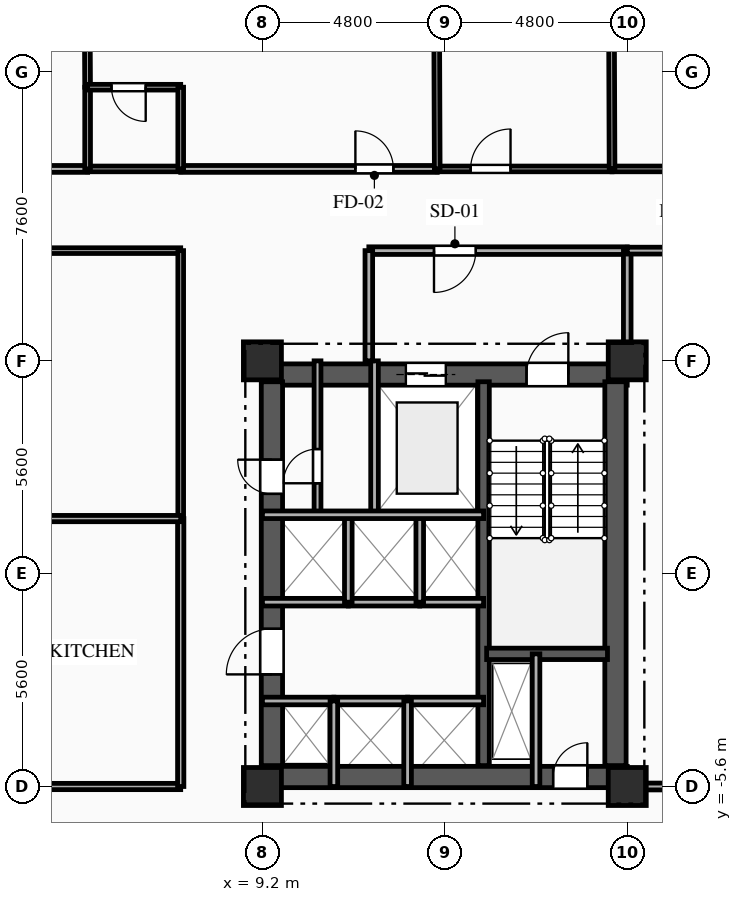
"""IFC4 building model, lengths in metres.
Left out: names, types, materials, properties, quantities, classifications, styles, units other than length and angle.
Written with IfcOpenShell. Run it as: python <this file> out.ifc"""

import sys

from ifc_helpers import new_model, si_unit, direction, frame, frame_2d, origin, origin_2d, place, context, subcontext, project, spatial, rectangle, extrude, element, fill, save


model = new_model("IFC4")
c1 = context("Model", 3, precision=1e-05, world=origin(), true_north=direction((0.0, 1.0)))
c2 = subcontext(c1, "Body", "Model", "MODEL_VIEW")
j1 = project(units=[si_unit("LENGTHUNIT", "METRE"), si_unit("PLANEANGLEUNIT", "RADIAN")], contexts=[c1])
p1 = place(None, origin())
s1 = spatial("IfcSite", under=j1, at=p1, CompositionType="ELEMENT")
p2 = place(p1, origin())
s2 = spatial("IfcBuilding", under=s1, at=p2, CompositionType="ELEMENT")
p3 = place(p2, frame((0.0, 0.0, 79.0)))
s3 = spatial("IfcBuildingStorey", under=s2, at=p3, CompositionType="ELEMENT", Elevation=79.0)
for number, where, z_axis, x_axis in (
    (1, (9.2, -5.6, 0.0), (0.0, 0.0, 1.0), (1.0, 0.0, 0.0)),
    (2, (9.2, 5.6, 0.0), (0.0, 0.0, 1.0), (1.0, 0.0, 0.0)),
    (3, (18.8, -5.6, 0.0), (0.0, 0.0, 1.0), (1.0, 0.0, 0.0)),
    (4, (18.8, 5.6, 0.0), (0.0, 0.0, 1.0), (1.0, 0.0, 0.0)),
):
    element("IfcColumn", number, at=place(p3, frame(where, z_axis=z_axis, x_axis=x_axis)), inside=s3, PredefinedType="COLUMN", context=c2, shape_type="SweptSolid", body=[
        extrude(rectangle(XDim=1.0, YDim=1.0, at=origin_2d()), origin(), (0.0, 0.0, 1.0), 3.35),
    ])
p4 = place(p3, frame((9.2, 5.24, 0.0), z_axis=(0.0, 0.0, 1.0), x_axis=(1.0, 0.0, 0.0)))
e5 = element("IfcWall", 5, at=p4, inside=s3, PredefinedType="SHEAR", context=c2, shape_type="SweptSolid", body=[
    extrude(rectangle(XDim=9.6, YDim=0.56, at=frame_2d((4.8, 0.0))), origin(), (0.0, 0.0, 1.0), 3.045),
])
p5 = place(p4, frame((6.95, 0.0, 0.0)))
e6 = element("IfcOpeningElement", 6, at=p5, cuts=e5, PredefinedType="OPENING", context=c2, shape_type="SweptSolid", body=[
    extrude(rectangle(XDim=1.1, YDim=2.15, at=frame_2d((0.55, 1.075))), frame((0.0, 0.29, 0.0), z_axis=(0.0, -1.0, 0.0), x_axis=(1.0, 0.0, 0.0)), (0.0, 0.0, 1.0), 0.58),
])
p6 = place(p4, frame((3.775, 0.0, 0.0)))
e7 = element("IfcOpeningElement", 7, at=p6, cuts=e5, PredefinedType="OPENING", context=c2, shape_type="SweptSolid", body=[
    extrude(rectangle(XDim=1.05, YDim=2.1, at=frame_2d((0.525, 1.05))), frame((0.0, 0.29, 0.0), z_axis=(0.0, -1.0, 0.0), x_axis=(1.0, 0.0, 0.0)), (0.0, 0.0, 1.0), 0.58),
])
p7 = place(p3, frame((9.2, -5.35, 0.0), z_axis=(0.0, 0.0, 1.0), x_axis=(1.0, 0.0, 0.0)))
e8 = element("IfcWall", 8, at=p7, inside=s3, PredefinedType="SHEAR", context=c2, shape_type="SweptSolid", body=[
    extrude(rectangle(XDim=9.6, YDim=0.56, at=frame_2d((4.8, 0.0))), origin(), (0.0, 0.0, 1.0), 3.045),
])
p8 = place(p7, frame((7.65, 0.0, 0.0)))
e9 = element("IfcOpeningElement", 9, at=p8, cuts=e8, PredefinedType="OPENING", context=c2, shape_type="SweptSolid", body=[
    extrude(rectangle(XDim=0.9, YDim=2.1, at=frame_2d((0.45, 1.05))), frame((0.0, 0.29, 0.0), z_axis=(0.0, -1.0, 0.0), x_axis=(1.0, 0.0, 0.0)), (0.0, 0.0, 1.0), 0.58),
])
p9 = place(p3, frame((9.45, -5.05, 0.0), z_axis=(0.0, 0.0, 1.0), x_axis=(0.0, 1.0, 0.0)))
e10 = element("IfcWall", 10, at=p9, inside=s3, PredefinedType="SHEAR", context=c2, shape_type="SweptSolid", body=[
    extrude(rectangle(XDim=10.1, YDim=0.56, at=frame_2d((5.05, 0.0))), origin(), (0.0, 0.0, 1.0), 3.045),
])
p10 = place(p9, frame((7.15, 0.0, 0.0)))
e11 = element("IfcOpeningElement", 11, at=p10, cuts=e10, PredefinedType="OPENING", context=c2, shape_type="SweptSolid", body=[
    extrude(rectangle(XDim=0.9, YDim=2.1, at=frame_2d((0.45, 1.05))), frame((0.0, 0.29, 0.0), z_axis=(0.0, -1.0, 0.0), x_axis=(1.0, 0.0, 0.0)), (0.0, 0.0, 1.0), 0.58),
])
p11 = place(p9, frame((2.4, 0.0, 0.0)))
e12 = element("IfcOpeningElement", 12, at=p11, cuts=e10, PredefinedType="OPENING", context=c2, shape_type="SweptSolid", body=[
    extrude(rectangle(XDim=1.2, YDim=2.15, at=frame_2d((0.6, 1.075))), frame((0.0, 0.29, 0.0), z_axis=(0.0, -1.0, 0.0), x_axis=(1.0, 0.0, 0.0)), (0.0, 0.0, 1.0), 0.58),
])
p12 = place(p3, frame((18.49, -5.05, 0.0), z_axis=(0.0, 0.0, 1.0), x_axis=(0.0, 1.0, 0.0)))
e13 = element("IfcWall", 13, at=p12, inside=s3, PredefinedType="SHEAR", context=c2, shape_type="SweptSolid", body=[
    extrude(rectangle(XDim=10.1, YDim=0.56, at=frame_2d((5.05, 0.0))), origin(), (0.0, 0.0, 1.0), 3.045),
])
p13 = place(p3, frame((15.02, -5.05, 0.0), z_axis=(0.0, 0.0, 1.0), x_axis=(0.0, 1.0, 0.0)))
e14 = element("IfcWall", 14, at=p13, inside=s3, PredefinedType="SHEAR", context=c2, shape_type="SweptSolid", body=[
    extrude(rectangle(XDim=10.1, YDim=0.3, at=frame_2d((5.05, 0.0))), origin(), (0.0, 0.0, 1.0), 3.045),
])
p14 = place(p3, frame((15.1, -2.11, 0.0), z_axis=(0.0, 0.0, 1.0), x_axis=(1.0, 0.0, 0.0)))
e15 = element("IfcWall", 15, at=p14, inside=s3, PredefinedType="SHEAR", context=c2, shape_type="SweptSolid", body=[
    extrude(rectangle(XDim=3.18, YDim=0.3, at=frame_2d((1.59, 0.0))), origin(), (0.0, 0.0, 1.0), 3.045),
])
p15 = place(p3, frame((16.4, -2.11, 0.0), z_axis=(0.0, 0.0, 1.0), x_axis=(0.0, -1.0, 0.0)))
e16 = element("IfcWall", 16, at=p15, inside=s3, PredefinedType="PARTITIONING", context=c2, shape_type="SweptSolid", body=[
    extrude(rectangle(XDim=3.49, YDim=0.2, at=frame_2d((1.745, 0.0))), origin(), (0.0, 0.0, 1.0), 3.045),
])
p16 = place(p3, frame((12.15, 5.6, 0.0), z_axis=(0.0, 0.0, 1.0), x_axis=(0.0, -1.0, 0.0)))
e17 = element("IfcWall", 17, at=p16, inside=s3, PredefinedType="PARTITIONING", context=c2, shape_type="SweptSolid", body=[
    extrude(rectangle(XDim=4.05, YDim=0.2, at=frame_2d((2.025, 0.0))), origin(), (0.0, 0.0, 1.0), 3.045),
])
p17 = place(p3, frame((18.8, 8.5, 0.0), z_axis=(0.0, 0.0, 1.0), x_axis=(-1.0, 0.0, 0.0)))
e18 = element("IfcWall", 18, at=p17, inside=s3, PredefinedType="PARTITIONING", context=c2, shape_type="SweptSolid", body=[
    extrude(rectangle(XDim=6.8, YDim=0.2, at=frame_2d((3.4, 0.0))), origin(), (0.0, 0.0, 1.0), 3.045),
])
p18 = place(p17, frame((3.985, 0.0, 0.0)))
e19 = element("IfcOpeningElement", 19, at=p18, cuts=e18, PredefinedType="OPENING", context=c2, shape_type="SweptSolid", body=[
    extrude(rectangle(XDim=1.1, YDim=2.15, at=frame_2d((0.55, 1.075))), frame((0.0, 0.11, 0.0), z_axis=(0.0, -1.0, 0.0), x_axis=(1.0, 0.0, 0.0)), (0.0, 0.0, 1.0), 0.22),
])
p19 = place(p3, frame((12.0, 8.5, 0.0), z_axis=(0.0, 0.0, 1.0), x_axis=(0.0, -1.0, 0.0)))
e20 = element("IfcWall", 20, at=p19, inside=s3, PredefinedType="PARTITIONING", context=c2, shape_type="SweptSolid", body=[
    extrude(rectangle(XDim=2.9, YDim=0.2, at=frame_2d((1.45, 0.0))), origin(), (0.0, 0.0, 1.0), 3.045),
])
p20 = place(p3, frame((18.8, 5.6, 0.0), z_axis=(0.0, 0.0, 1.0), x_axis=(0.0, 1.0, 0.0)))
e21 = element("IfcWall", 21, at=p20, inside=s3, PredefinedType="PARTITIONING", context=c2, shape_type="SweptSolid", body=[
    extrude(rectangle(XDim=2.9, YDim=0.2, at=frame_2d((1.45, 0.0))), origin(), (0.0, 0.0, 1.0), 2.53),
])
p21 = place(p3, frame((10.65, 1.55, 0.0), z_axis=(0.0, 0.0, 1.0), x_axis=(0.0, 1.0, 0.0)))
e22 = element("IfcWall", 22, at=p21, inside=s3, PredefinedType="PARTITIONING", context=c2, shape_type="SweptSolid", body=[
    extrude(rectangle(XDim=4.05, YDim=0.18, at=frame_2d((2.025, 0.0))), origin(), (0.0, 0.0, 1.0), 3.045),
])
p22 = place(p21, frame((0.829, 0.0, 0.0)))
e23 = element("IfcOpeningElement", 23, at=p22, cuts=e22, PredefinedType="OPENING", context=c2, shape_type="SweptSolid", body=[
    extrude(rectangle(XDim=0.9, YDim=2.1, at=frame_2d((0.45, 1.05))), frame((0.0, 0.1, 0.0), z_axis=(0.0, -1.0, 0.0), x_axis=(1.0, 0.0, 0.0)), (0.0, 0.0, 1.0), 0.2),
])
p23 = place(p3, frame((9.2, -3.35, 0.0), z_axis=(0.0, 0.0, 1.0), x_axis=(1.0, 0.0, 0.0)))
e24 = element("IfcWall", 24, at=p23, inside=s3, PredefinedType="PARTITIONING", context=c2, shape_type="SweptSolid", body=[
    extrude(rectangle(XDim=1.88, YDim=0.2, at=frame_2d((0.94, 0.0))), origin(), (0.0, 0.0, 1.0), 2.76),
])
p24 = place(p3, frame((11.08, -3.35, 0.0), z_axis=(0.0, 0.0, 1.0), x_axis=(1.0, 0.0, 0.0)))
e25 = element("IfcWall", 25, at=p24, inside=s3, PredefinedType="PARTITIONING", context=c2, shape_type="SweptSolid", body=[
    extrude(rectangle(XDim=1.94, YDim=0.2, at=frame_2d((0.97, 0.0))), origin(), (0.0, 0.0, 1.0), 3.045),
])
p25 = place(p3, frame((13.02, -3.35, 0.0), z_axis=(0.0, 0.0, 1.0), x_axis=(1.0, 0.0, 0.0)))
e26 = element("IfcWall", 26, at=p25, inside=s3, PredefinedType="PARTITIONING", context=c2, shape_type="SweptSolid", body=[
    extrude(rectangle(XDim=2.0, YDim=0.2, at=frame_2d((1.0, 0.0))), origin(), (0.0, 0.0, 1.0), 3.045),
])
p26 = place(p3, frame((11.46, -0.75, 0.0), z_axis=(0.0, 0.0, 1.0), x_axis=(-1.0, 0.0, 0.0)))
e27 = element("IfcWall", 27, at=p26, inside=s3, PredefinedType="PARTITIONING", context=c2, shape_type="SweptSolid", body=[
    extrude(rectangle(XDim=2.26, YDim=0.2, at=frame_2d((1.13, 0.0))), origin(), (0.0, 0.0, 1.0), 3.045),
])
p27 = place(p3, frame((13.34, -0.75, 0.0), z_axis=(0.0, 0.0, 1.0), x_axis=(-1.0, 0.0, 0.0)))
e28 = element("IfcWall", 28, at=p27, inside=s3, PredefinedType="PARTITIONING", context=c2, shape_type="SweptSolid", body=[
    extrude(rectangle(XDim=1.88, YDim=0.2, at=frame_2d((0.94, 0.0))), origin(), (0.0, 0.0, 1.0), 3.045),
])
p28 = place(p3, frame((15.02, -0.75, 0.0), z_axis=(0.0, 0.0, 1.0), x_axis=(-1.0, 0.0, 0.0)))
e29 = element("IfcWall", 29, at=p28, inside=s3, PredefinedType="PARTITIONING", context=c2, shape_type="SweptSolid", body=[
    extrude(rectangle(XDim=1.68, YDim=0.2, at=frame_2d((0.84, 0.0))), origin(), (0.0, 0.0, 1.0), 3.045),
])
for number, where, z_axis, x_axis in (
    (30, (11.08, -5.6, 0.0), (0.0, 0.0, 1.0), (0.0, 1.0, 0.0)),
    (31, (13.02, -5.6, 0.0), (0.0, 0.0, 1.0), (0.0, 1.0, 0.0)),
):
    element("IfcWall", number, at=place(p3, frame(where, z_axis=z_axis, x_axis=x_axis)), inside=s3, PredefinedType="PARTITIONING", context=c2, shape_type="SweptSolid", body=[
        extrude(rectangle(XDim=2.25, YDim=0.2, at=frame_2d((1.125, 0.0))), origin(), (0.0, 0.0, 1.0), 3.045),
    ])
for number, where, z_axis, x_axis in (
    (32, (11.46, -0.75, 0.0), (0.0, 0.0, 1.0), (0.0, 1.0, 0.0)),
    (33, (13.34, -0.75, 0.0), (0.0, 0.0, 1.0), (0.0, 1.0, 0.0)),
):
    element("IfcWall", number, at=place(p3, frame(where, z_axis=z_axis, x_axis=x_axis)), inside=s3, PredefinedType="PARTITIONING", context=c2, shape_type="SweptSolid", body=[
        extrude(rectangle(XDim=2.3, YDim=0.2, at=frame_2d((1.15, 0.0))), origin(), (0.0, 0.0, 1.0), 3.045),
    ])
p29 = place(p3, frame((21.45, 8.5, 0.0), z_axis=(0.0, 0.0, 1.0), x_axis=(-1.0, 0.0, 0.0)))
e34 = element("IfcWall", 34, at=p29, inside=s3, PredefinedType="PARTITIONING", context=c2, shape_type="SweptSolid", body=[
    extrude(rectangle(XDim=2.65, YDim=0.18, at=frame_2d((1.325, 0.0))), origin(), (0.0, 0.0, 1.0), 3.045),
])
p30 = place(p29, frame((0.641, 0.0, 0.0)))
e35 = element("IfcOpeningElement", 35, at=p30, cuts=e34, PredefinedType="OPENING", context=c2, shape_type="SweptSolid", body=[
    extrude(rectangle(XDim=1.0, YDim=2.15, at=frame_2d((0.5, 1.075))), frame((0.0, 0.1, 0.0), z_axis=(0.0, -1.0, 0.0), x_axis=(1.0, 0.0, 0.0)), (0.0, 0.0, 1.0), 0.2),
])
p31 = place(p3, frame((0.0, 10.65, 0.0), z_axis=(0.0, 0.0, 1.0), x_axis=(1.0, 0.0, 0.0)))
e36 = element("IfcWall", 36, at=p31, inside=s3, PredefinedType="PARTITIONING", context=c2, shape_type="SweptSolid", body=[
    extrude(rectangle(XDim=4.6, YDim=0.18, at=frame_2d((2.3, 0.0))), origin(), (0.0, 0.0, 1.0), 3.045),
])
p32 = place(p31, frame((0.885, 0.0, 0.0)))
e37 = element("IfcOpeningElement", 37, at=p32, cuts=e36, PredefinedType="OPENING", context=c2, shape_type="SweptSolid", body=[
    extrude(rectangle(XDim=1.0, YDim=2.15, at=frame_2d((0.5, 1.075))), frame((0.0, 0.1, 0.0), z_axis=(0.0, -1.0, 0.0), x_axis=(1.0, 0.0, 0.0)), (0.0, 0.0, 1.0), 0.2),
])
p33 = place(p3, frame((7.05, 10.65, 0.0), z_axis=(0.0, 0.0, 1.0), x_axis=(1.0, 0.0, 0.0)))
e38 = element("IfcWall", 38, at=p33, inside=s3, PredefinedType="PARTITIONING", context=c2, shape_type="SweptSolid", body=[
    extrude(rectangle(XDim=6.75, YDim=0.18, at=frame_2d((3.375, 0.0))), origin(), (0.0, 0.0, 1.0), 3.045),
])
p34 = place(p33, frame((4.596, 0.0, 0.0)))
e39 = element("IfcOpeningElement", 39, at=p34, cuts=e38, PredefinedType="OPENING", context=c2, shape_type="SweptSolid", body=[
    extrude(rectangle(XDim=1.0, YDim=2.15, at=frame_2d((0.5, 1.075))), frame((0.0, 0.1, 0.0), z_axis=(0.0, -1.0, 0.0), x_axis=(1.0, 0.0, 0.0)), (0.0, 0.0, 1.0), 0.2),
])
p35 = place(p3, frame((4.6, 10.65, 0.0), z_axis=(0.0, 0.0, 1.0), x_axis=(1.0, 0.0, 0.0)))
e40 = element("IfcWall", 40, at=p35, inside=s3, PredefinedType="PLUMBINGWALL", context=c2, shape_type="SweptSolid", body=[
    extrude(rectangle(XDim=2.45, YDim=0.15, at=frame_2d((1.225, 0.0))), origin(), (0.0, 0.0, 1.0), 3.045),
])
p36 = place(p3, frame((13.8, 10.65, 0.0), z_axis=(0.0, 0.0, 1.0), x_axis=(1.0, 0.0, 0.0)))
e41 = element("IfcWall", 41, at=p36, inside=s3, PredefinedType="PARTITIONING", context=c2, shape_type="SweptSolid", body=[
    extrude(rectangle(XDim=4.6, YDim=0.15, at=frame_2d((2.3, 0.0))), origin(), (0.0, 0.0, 1.0), 3.045),
])
p37 = place(p36, frame((0.879, 0.0, 0.0)))
e42 = element("IfcOpeningElement", 42, at=p37, cuts=e41, PredefinedType="OPENING", context=c2, shape_type="SweptSolid", body=[
    extrude(rectangle(XDim=1.05, YDim=2.15, at=frame_2d((0.525, 1.075))), frame((0.0, 0.085, 0.0), z_axis=(0.0, -1.0, 0.0), x_axis=(1.0, 0.0, 0.0)), (0.0, 0.0, 1.0), 0.17),
])
p38 = place(p3, frame((18.4, 10.65, 0.0), z_axis=(0.0, 0.0, 1.0), x_axis=(1.0, 0.0, 0.0)))
e43 = element("IfcWall", 43, at=p38, inside=s3, PredefinedType="PARTITIONING", context=c2, shape_type="SweptSolid", body=[
    extrude(rectangle(XDim=4.6, YDim=0.15, at=frame_2d((2.3, 0.0))), origin(), (0.0, 0.0, 1.0), 3.045),
])
p39 = place(p38, frame((2.671, 0.0, 0.0)))
e44 = element("IfcOpeningElement", 44, at=p39, cuts=e43, PredefinedType="OPENING", context=c2, shape_type="SweptSolid", body=[
    extrude(rectangle(XDim=1.05, YDim=2.15, at=frame_2d((0.525, 1.075))), frame((0.0, 0.085, 0.0), z_axis=(0.0, -1.0, 0.0), x_axis=(1.0, 0.0, 0.0)), (0.0, 0.0, 1.0), 0.17),
])
p40 = place(p3, frame((7.05, 8.5, 0.0), z_axis=(0.0, 0.0, 1.0), x_axis=(-1.0, 0.0, 0.0)))
e45 = element("IfcWall", 45, at=p40, inside=s3, PredefinedType="PARTITIONING", context=c2, shape_type="SweptSolid", body=[
    extrude(rectangle(XDim=7.05, YDim=0.15, at=frame_2d((3.525, 0.0))), origin(), (0.0, 0.0, 1.0), 3.045),
])
p41 = place(p3, frame((18.8, -5.6, 0.0), z_axis=(0.0, 0.0, 1.0), x_axis=(1.0, 0.0, 0.0)))
e46 = element("IfcWall", 46, at=p41, inside=s3, PredefinedType="PARTITIONING", context=c2, shape_type="SweptSolid", body=[
    extrude(rectangle(XDim=2.65, YDim=0.18, at=frame_2d((1.325, 0.0))), origin(), (0.0, 0.0, 1.0), 2.53),
])
p42 = place(p3, frame((0.0, -5.6, 0.0), z_axis=(0.0, 0.0, 1.0), x_axis=(1.0, 0.0, 0.0)))
e47 = element("IfcWall", 47, at=p42, inside=s3, PredefinedType="PARTITIONING", context=c2, shape_type="SweptSolid", body=[
    extrude(rectangle(XDim=7.05, YDim=0.165, at=frame_2d((3.525, 0.0))), origin(), (0.0, 0.0, 1.0), 2.53),
])
p43 = place(p3, frame((7.05, -5.6, 0.0), z_axis=(0.0, 0.0, 1.0), x_axis=(0.0, 1.0, 0.0)))
e48 = element("IfcWall", 48, at=p43, inside=s3, PredefinedType="PARTITIONING", context=c2, shape_type="SweptSolid", body=[
    extrude(rectangle(XDim=7.05, YDim=0.165, at=frame_2d((3.525, 0.0))), origin(), (0.0, 0.0, 1.0), 3.045),
])
p44 = place(p3, frame((7.05, 1.45, 0.0), z_axis=(0.0, 0.0, 1.0), x_axis=(0.0, 1.0, 0.0)))
e49 = element("IfcWall", 49, at=p44, inside=s3, PredefinedType="PARTITIONING", context=c2, shape_type="SweptSolid", body=[
    extrude(rectangle(XDim=7.05, YDim=0.15, at=frame_2d((3.525, 0.0))), origin(), (0.0, 0.0, 1.0), 3.045),
])
p45 = place(p3, frame((4.556, 20.914, 0.0), z_axis=(0.0, 0.0, 1.0), x_axis=(0.005416060659, -0.999985333036, 0.0)))
e50 = element("IfcWall", 50, at=p45, inside=s3, PredefinedType="PARTITIONING", context=c2, shape_type="SweptSolid", body=[
    extrude(rectangle(XDim=8.114, YDim=0.15, at=frame_2d((4.057, 0.0))), origin(), (0.0, 0.0, 1.0), 3.045),
])
p46 = place(p3, frame((4.6, 12.8, 0.0), z_axis=(0.0, 0.0, 1.0), x_axis=(0.0, -1.0, 0.0)))
e51 = element("IfcWall", 51, at=p46, inside=s3, PredefinedType="PLUMBINGWALL", context=c2, shape_type="SweptSolid", body=[
    extrude(rectangle(XDim=2.15, YDim=0.15, at=frame_2d((1.075, 0.0))), origin(), (0.0, 0.0, 1.0), 3.045),
])
p47 = place(p3, frame((7.05, 12.8, 0.0), z_axis=(0.0, 0.0, 1.0), x_axis=(-1.0, 0.0, 0.0)))
e52 = element("IfcWall", 52, at=p47, inside=s3, PredefinedType="PLUMBINGWALL", context=c2, shape_type="SweptSolid", body=[
    extrude(rectangle(XDim=2.45, YDim=0.15, at=frame_2d((1.225, 0.0))), origin(), (0.0, 0.0, 1.0), 3.045),
])
p48 = place(p47, frame((0.921, 0.0, 0.0)))
e53 = element("IfcOpeningElement", 53, at=p48, cuts=e52, PredefinedType="OPENING", context=c2, shape_type="SweptSolid", body=[
    extrude(rectangle(XDim=0.9, YDim=2.1, at=frame_2d((0.45, 1.05))), frame((0.0, 0.085, 0.0), z_axis=(0.0, -1.0, 0.0), x_axis=(1.0, 0.0, 0.0)), (0.0, 0.0, 1.0), 0.17),
])
p49 = place(p3, frame((7.05, 10.65, 0.0), z_axis=(0.0, 0.0, 1.0), x_axis=(0.0, 1.0, 0.0)))
e54 = element("IfcWall", 54, at=p49, inside=s3, PredefinedType="PLUMBINGWALL", context=c2, shape_type="SweptSolid", body=[
    extrude(rectangle(XDim=2.15, YDim=0.15, at=frame_2d((1.075, 0.0))), origin(), (0.0, 0.0, 1.0), 3.045),
])
p50 = place(p3, frame((13.756, 21.881, 0.0), z_axis=(0.0, 0.0, 1.0), x_axis=(0.003912928458, -0.999992344466, 0.0)))
e55 = element("IfcWall", 55, at=p50, inside=s3, PredefinedType="PARTITIONING", context=c2, shape_type="SweptSolid", body=[
    extrude(rectangle(XDim=11.231, YDim=0.15, at=frame_2d((5.615, 0.0))), origin(), (0.0, 0.0, 1.0), 3.045),
])
p51 = place(p3, frame((18.356, 22.364, 0.0), z_axis=(0.0, 0.0, 1.0), x_axis=(0.003730617419, -0.999993041223, 0.0)))
e56 = element("IfcWall", 56, at=p51, inside=s3, PredefinedType="PARTITIONING", context=c2, shape_type="SweptSolid", body=[
    extrude(rectangle(XDim=11.714, YDim=0.15, at=frame_2d((5.857, 0.0))), origin(), (0.0, 0.0, 1.0), 2.53),
])
p52 = place(p3, frame((-7.05, 1.45, 0.0), z_axis=(0.0, 0.0, 1.0), x_axis=(1.0, 0.0, 0.0)))
e57 = element("IfcWall", 57, at=p52, inside=s3, PredefinedType="PARTITIONING", context=c2, shape_type="SweptSolid", body=[
    extrude(rectangle(XDim=14.1, YDim=0.165, at=frame_2d((7.05, 0.0))), origin(), (0.0, 0.0, 1.0), 3.045),
])
p53 = place(p3, frame((9.2, 1.55, 0.0), z_axis=(0.0, 0.0, 1.0), x_axis=(1.0, 0.0, 0.0)))
e58 = element("IfcWall", 58, at=p53, inside=s3, PredefinedType="PARTITIONING", context=c2, shape_type="SweptSolid", body=[
    extrude(rectangle(XDim=5.82, YDim=0.2, at=frame_2d((2.91, 0.0))), origin(), (0.0, 0.0, 1.0), 3.045),
])
p54 = place(p5, origin())
e59 = element("IfcDoor", 59, at=p54, inside=s3, OperationType="SINGLE_SWING_RIGHT", PredefinedType="DOOR", context=c2, shape_type="SweptSolid", body=[
    extrude(rectangle(XDim=1.1, YDim=2.15, at=frame_2d((0.55, 1.075))), frame((0.0, 0.025, 0.0), z_axis=(0.0, -1.0, 0.0), x_axis=(1.0, 0.0, 0.0)), (0.0, 0.0, 1.0), 0.05),
])
fill(e6, e59)
p55 = place(p6, origin())
e60 = element("IfcDoor", 60, at=p55, inside=s3, OperationType="DOUBLE_DOOR_SLIDING", PredefinedType="DOOR", context=c2, shape_type="SweptSolid", body=[
    extrude(rectangle(XDim=1.05, YDim=2.1, at=frame_2d((0.525, 1.05))), frame((0.0, 0.025, 0.0), z_axis=(0.0, -1.0, 0.0), x_axis=(1.0, 0.0, 0.0)), (0.0, 0.0, 1.0), 0.05),
])
fill(e7, e60)
p56 = place(p8, origin())
e61 = element("IfcDoor", 61, at=p56, inside=s3, OperationType="SINGLE_SWING_RIGHT", PredefinedType="DOOR", context=c2, shape_type="SweptSolid", body=[
    extrude(rectangle(XDim=0.9, YDim=2.1, at=frame_2d((0.45, 1.05))), frame((0.0, 0.025, 0.0), z_axis=(0.0, -1.0, 0.0), x_axis=(1.0, 0.0, 0.0)), (0.0, 0.0, 1.0), 0.05),
])
fill(e9, e61)
p57 = place(p18, origin())
e62 = element("IfcDoor", 62, at=p57, inside=s3, OperationType="SINGLE_SWING_RIGHT", PredefinedType="DOOR", context=c2, shape_type="SweptSolid", body=[
    extrude(rectangle(XDim=1.1, YDim=2.15, at=frame_2d((0.55, 1.075))), frame((0.0, 0.025, 0.0), z_axis=(0.0, -1.0, 0.0), x_axis=(1.0, 0.0, 0.0)), (0.0, 0.0, 1.0), 0.05),
])
fill(e19, e62)
p58 = place(p22, origin())
e63 = element("IfcDoor", 63, at=p58, inside=s3, OperationType="SINGLE_SWING_LEFT", PredefinedType="DOOR", context=c2, shape_type="SweptSolid", body=[
    extrude(rectangle(XDim=0.9, YDim=2.1, at=frame_2d((0.45, 1.05))), frame((0.0, 0.025, 0.0), z_axis=(0.0, -1.0, 0.0), x_axis=(1.0, 0.0, 0.0)), (0.0, 0.0, 1.0), 0.05),
])
fill(e23, e63)
p59 = place(p10, origin())
e64 = element("IfcDoor", 64, at=p59, inside=s3, OperationType="SINGLE_SWING_RIGHT", PredefinedType="DOOR", context=c2, shape_type="SweptSolid", body=[
    extrude(rectangle(XDim=0.9, YDim=2.1, at=frame_2d((0.45, 1.05))), frame((0.0, 0.025, 0.0), z_axis=(0.0, -1.0, 0.0), x_axis=(1.0, 0.0, 0.0)), (0.0, 0.0, 1.0), 0.05),
])
fill(e11, e64)
p60 = place(p11, origin())
e65 = element("IfcDoor", 65, at=p60, inside=s3, OperationType="SINGLE_SWING_LEFT", PredefinedType="DOOR", context=c2, shape_type="SweptSolid", body=[
    extrude(rectangle(XDim=1.2, YDim=2.15, at=frame_2d((0.6, 1.075))), frame((0.0, 0.025, 0.0), z_axis=(0.0, -1.0, 0.0), x_axis=(1.0, 0.0, 0.0)), (0.0, 0.0, 1.0), 0.05),
])
fill(e12, e65)
p61 = place(p34, origin())
e66 = element("IfcDoor", 66, at=p61, inside=s3, OperationType="SINGLE_SWING_LEFT", PredefinedType="DOOR", context=c2, shape_type="SweptSolid", body=[
    extrude(rectangle(XDim=1.0, YDim=2.15, at=frame_2d((0.5, 1.075))), frame((0.0, 0.025, 0.0), z_axis=(0.0, -1.0, 0.0), x_axis=(1.0, 0.0, 0.0)), (0.0, 0.0, 1.0), 0.05),
])
fill(e39, e66)
p62 = place(p37, origin())
e67 = element("IfcDoor", 67, at=p62, inside=s3, OperationType="SINGLE_SWING_RIGHT", PredefinedType="DOOR", context=c2, shape_type="SweptSolid", body=[
    extrude(rectangle(XDim=1.05, YDim=2.15, at=frame_2d((0.525, 1.075))), frame((0.0, 0.025, 0.0), z_axis=(0.0, -1.0, 0.0), x_axis=(1.0, 0.0, 0.0)), (0.0, 0.0, 1.0), 0.05),
])
fill(e42, e67)
p63 = place(p48, origin())
e68 = element("IfcDoor", 68, at=p63, inside=s3, OperationType="SINGLE_SWING_LEFT", PredefinedType="DOOR", context=c2, shape_type="SweptSolid", body=[
    extrude(rectangle(XDim=0.9, YDim=2.1, at=frame_2d((0.45, 1.05))), frame((0.0, 0.025, 0.0), z_axis=(0.0, -1.0, 0.0), x_axis=(1.0, 0.0, 0.0)), (0.0, 0.0, 1.0), 0.05),
])
fill(e53, e68)
save(model, sys.argv[1])
